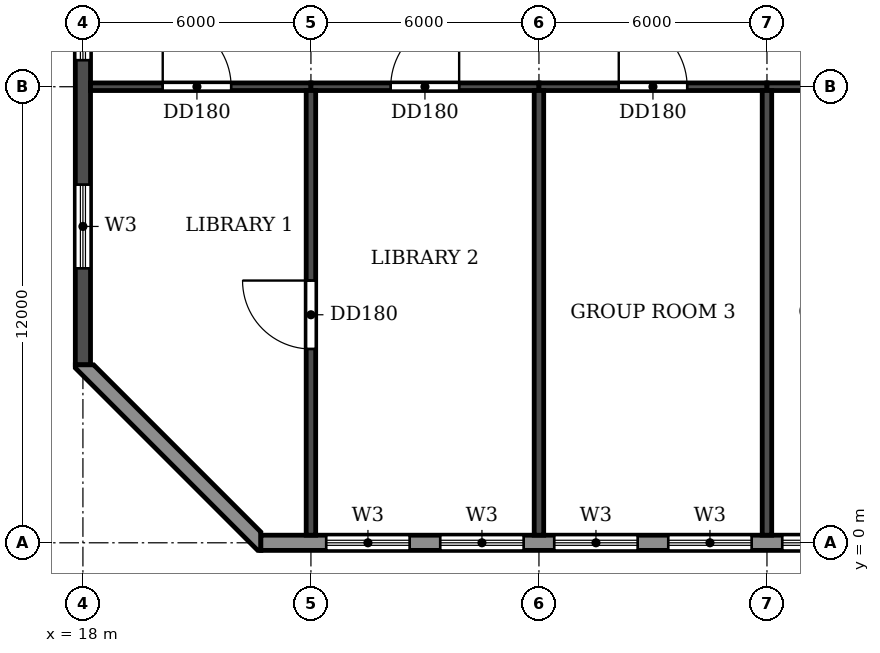
"""IFC4 building model, lengths in metres.
Left out: names, types, materials, properties, quantities, classifications, styles, units other than length and angle.
Written with IfcOpenShell. Run it as: python <this file> out.ifc"""

import sys

from ifc_helpers import new_model, si_unit, direction, frame, frame_2d, origin, place, context, subcontext, project, spatial, polyline, rectangle, outline, extrude, element, fill, save


model = new_model("IFC4")
c1 = context("Model", 3, precision=1e-05, world=origin(), true_north=direction((0.0, 1.0)))
c2 = subcontext(c1, "Body", "Model", "MODEL_VIEW")
j1 = project(units=[si_unit("LENGTHUNIT", "METRE"), si_unit("PLANEANGLEUNIT", "RADIAN")], contexts=[c1])
p1 = place(None, origin())
s1 = spatial("IfcSite", under=j1, at=p1, CompositionType="ELEMENT")
p2 = place(p1, origin())
s2 = spatial("IfcBuilding", under=s1, at=p2, CompositionType="ELEMENT")
p3 = place(p2, frame((0.0, 0.0, 211.5)))
s3 = spatial("IfcBuildingStorey", under=s2, at=p3, CompositionType="ELEMENT", Elevation=211.5)
p4 = place(p3, frame((24.0, 0.2, 0.0), z_axis=(0.0, 0.0, 1.0), x_axis=(0.0, 1.0, 0.0)))
e1 = element("IfcWall", 1, at=p4, inside=s3, PredefinedType="SHEAR", context=c2, shape_type="SweptSolid", body=[
    extrude(rectangle(XDim=11.7, YDim=0.25, at=frame_2d((5.85, 0.0))), origin(), (0.0, 0.0, 1.0), 2.95),
])
p5 = place(p4, frame((4.9, 0.0, 0.0)))
e2 = element("IfcOpeningElement", 2, at=p5, cuts=e1, PredefinedType="OPENING", context=c2, shape_type="SweptSolid", body=[
    extrude(rectangle(XDim=1.8, YDim=2.1, at=frame_2d((0.9, 1.05))), frame((0.0, 0.135, 0.0), z_axis=(0.0, -1.0, 0.0), x_axis=(1.0, 0.0, 0.0)), (0.0, 0.0, 1.0), 0.27),
])
for number, where, z_axis, x_axis in (
    (3, (30.0, 0.2, 0.0), (0.0, 0.0, 1.0), (0.0, 1.0, 0.0)),
    (4, (36.0, 0.2, 0.0), (0.0, 0.0, 1.0), (0.0, 1.0, 0.0)),
):
    element("IfcWall", number, at=place(p3, frame(where, z_axis=z_axis, x_axis=x_axis)), inside=s3, PredefinedType="SHEAR", context=c2, shape_type="SweptSolid", body=[
        extrude(rectangle(XDim=11.7, YDim=0.25, at=frame_2d((5.85, 0.0))), origin(), (0.0, 0.0, 1.0), 2.95),
    ])
p6 = place(p3, frame((18.0, 4.683, 0.0), z_axis=(0.0, 0.0, 1.0), x_axis=(0.0, 1.0, 0.0)))
e5 = element("IfcWall", 5, at=p6, inside=s3, PredefinedType="SHEAR", context=c2, shape_type="SweptSolid", body=[
    extrude(rectangle(XDim=31.834, YDim=0.4, at=frame_2d((15.917, 0.0))), origin(), (0.0, 0.0, 1.0), 2.95),
])
p7 = place(p6, frame((23.817, 0.0, 0.9)))
e6 = element("IfcOpeningElement", 6, at=p7, cuts=e5, PredefinedType="OPENING", context=c2, shape_type="SweptSolid", body=[
    extrude(rectangle(XDim=1.2, YDim=1.5, at=frame_2d((0.6, 0.75))), frame((0.0, 0.21, 0.0), z_axis=(0.0, -1.0, 0.0), x_axis=(1.0, 0.0, 0.0)), (0.0, 0.0, 1.0), 0.42),
])
p8 = place(p6, frame((8.017, 0.0, 0.9)))
e7 = element("IfcOpeningElement", 7, at=p8, cuts=e5, PredefinedType="OPENING", context=c2, shape_type="SweptSolid", body=[
    extrude(rectangle(XDim=1.2, YDim=1.5, at=frame_2d((0.6, 0.75))), frame((0.0, 0.21, 0.0), z_axis=(0.0, -1.0, 0.0), x_axis=(1.0, 0.0, 0.0)), (0.0, 0.0, 1.0), 0.42),
])
p9 = place(p6, frame((27.694, 0.0, 0.6)))
e8 = element("IfcOpeningElement", 8, at=p9, cuts=e5, PredefinedType="OPENING", context=c2, shape_type="SweptSolid", body=[
    extrude(rectangle(XDim=2.2, YDim=1.8, at=frame_2d((1.1, 0.9))), frame((0.0, 0.21, 0.0), z_axis=(0.0, -1.0, 0.0), x_axis=(1.0, 0.0, 0.0)), (0.0, 0.0, 1.0), 0.42),
])
p10 = place(p6, frame((2.541, 0.0, 0.6)))
e9 = element("IfcOpeningElement", 9, at=p10, cuts=e5, PredefinedType="OPENING", context=c2, shape_type="SweptSolid", body=[
    extrude(rectangle(XDim=2.2, YDim=1.8, at=frame_2d((1.1, 0.9))), frame((0.0, 0.21, 0.0), z_axis=(0.0, -1.0, 0.0), x_axis=(1.0, 0.0, 0.0)), (0.0, 0.0, 1.0), 0.42),
])
p11 = place(p6, frame((15.917, 0.0, 0.9)))
e10 = element("IfcOpeningElement", 10, at=p11, cuts=e5, PredefinedType="OPENING", context=c2, shape_type="SweptSolid", body=[
    extrude(rectangle(XDim=1.2, YDim=1.5, at=frame_2d((0.6, 0.75))), frame((0.0, 0.21, 0.0), z_axis=(0.0, -1.0, 0.0), x_axis=(1.0, 0.0, 0.0)), (0.0, 0.0, 1.0), 0.42),
])
p12 = place(p3, frame((18.2, 12.0, 0.0), z_axis=(0.0, 0.0, 1.0), x_axis=(1.0, 0.0, 0.0)))
e11 = element("IfcWall", 11, at=p12, inside=s3, PredefinedType="SHEAR", context=c2, shape_type="SweptSolid", body=[
    extrude(rectangle(XDim=5.8, YDim=0.2, at=frame_2d((2.9, 0.0))), origin(), (0.0, 0.0, 1.0), 2.35),
])
p13 = place(p12, frame((1.9, 0.0, 0.0)))
e12 = element("IfcOpeningElement", 12, at=p13, cuts=e11, PredefinedType="OPENING", context=c2, shape_type="SweptSolid", body=[
    extrude(rectangle(XDim=1.8, YDim=2.1, at=frame_2d((0.9, 1.05))), frame((0.0, 0.11, 0.0), z_axis=(0.0, -1.0, 0.0), x_axis=(1.0, 0.0, 0.0)), (0.0, 0.0, 1.0), 0.22),
])
p14 = place(p3, frame((24.0, 12.0, 0.0), z_axis=(0.0, 0.0, 1.0), x_axis=(1.0, 0.0, 0.0)))
e13 = element("IfcWall", 13, at=p14, inside=s3, PredefinedType="SHEAR", context=c2, shape_type="SweptSolid", body=[
    extrude(rectangle(XDim=6.0, YDim=0.2, at=frame_2d((3.0, 0.0))), origin(), (0.0, 0.0, 1.0), 2.35),
])
p15 = place(p14, frame((2.1, 0.0, 0.0)))
e14 = element("IfcOpeningElement", 14, at=p15, cuts=e13, PredefinedType="OPENING", context=c2, shape_type="SweptSolid", body=[
    extrude(rectangle(XDim=1.8, YDim=2.1, at=frame_2d((0.9, 1.05))), frame((0.0, 0.11, 0.0), z_axis=(0.0, -1.0, 0.0), x_axis=(1.0, 0.0, 0.0)), (0.0, 0.0, 1.0), 0.22),
])
p16 = place(p3, frame((30.0, 12.0, 0.0), z_axis=(0.0, 0.0, 1.0), x_axis=(1.0, 0.0, 0.0)))
e15 = element("IfcWall", 15, at=p16, inside=s3, PredefinedType="SHEAR", context=c2, shape_type="SweptSolid", body=[
    extrude(rectangle(XDim=6.0, YDim=0.2, at=frame_2d((3.0, 0.0))), origin(), (0.0, 0.0, 1.0), 2.35),
])
p17 = place(p16, frame((2.1, 0.0, 0.0)))
e16 = element("IfcOpeningElement", 16, at=p17, cuts=e15, PredefinedType="OPENING", context=c2, shape_type="SweptSolid", body=[
    extrude(rectangle(XDim=1.8, YDim=2.1, at=frame_2d((0.9, 1.05))), frame((0.0, 0.11, 0.0), z_axis=(0.0, -1.0, 0.0), x_axis=(1.0, 0.0, 0.0)), (0.0, 0.0, 1.0), 0.22),
])
p18 = place(p3, frame((36.0, 12.0, 0.0), z_axis=(0.0, 0.0, 1.0), x_axis=(1.0, 0.0, 0.0)))
e17 = element("IfcWall", 17, at=p18, inside=s3, PredefinedType="SHEAR", context=c2, shape_type="SweptSolid", body=[
    extrude(rectangle(XDim=6.0, YDim=0.2, at=frame_2d((3.0, 0.0))), origin(), (0.0, 0.0, 1.0), 2.35),
])
p19 = place(p18, frame((2.1, 0.0, 0.0)))
e18 = element("IfcOpeningElement", 18, at=p19, cuts=e17, PredefinedType="OPENING", context=c2, shape_type="SweptSolid", body=[
    extrude(rectangle(XDim=1.8, YDim=2.1, at=frame_2d((0.9, 1.05))), frame((0.0, 0.11, 0.0), z_axis=(0.0, -1.0, 0.0), x_axis=(1.0, 0.0, 0.0)), (0.0, 0.0, 1.0), 0.22),
])
p20 = place(p3, frame((22.683, 0.0, 0.0), z_axis=(0.0, 0.0, 1.0), x_axis=(1.0, 0.0, 0.0)))
e19 = element("IfcWall", 19, at=p20, inside=s3, PredefinedType="STANDARD", context=c2, shape_type="SweptSolid", body=[
    extrude(rectangle(XDim=56.634, YDim=0.4, at=frame_2d((28.317, 0.0))), origin(), (0.0, 0.0, 1.0), 2.95),
])
p21 = place(p20, frame((1.717, 0.0, 0.6)))
e20 = element("IfcOpeningElement", 20, at=p21, cuts=e19, PredefinedType="OPENING", context=c2, shape_type="SweptSolid", body=[
    extrude(rectangle(XDim=2.2, YDim=1.8, at=frame_2d((1.1, 0.9))), frame((0.0, 0.21, 0.0), z_axis=(0.0, -1.0, 0.0), x_axis=(1.0, 0.0, 0.0)), (0.0, 0.0, 1.0), 0.42),
])
p22 = place(p20, frame((4.717, 0.0, 0.6)))
e21 = element("IfcOpeningElement", 21, at=p22, cuts=e19, PredefinedType="OPENING", context=c2, shape_type="SweptSolid", body=[
    extrude(rectangle(XDim=2.2, YDim=1.8, at=frame_2d((1.1, 0.9))), frame((0.0, 0.21, 0.0), z_axis=(0.0, -1.0, 0.0), x_axis=(1.0, 0.0, 0.0)), (0.0, 0.0, 1.0), 0.42),
])
p23 = place(p20, frame((7.717, 0.0, 0.6)))
e22 = element("IfcOpeningElement", 22, at=p23, cuts=e19, PredefinedType="OPENING", context=c2, shape_type="SweptSolid", body=[
    extrude(rectangle(XDim=2.2, YDim=1.8, at=frame_2d((1.1, 0.9))), frame((0.0, 0.21, 0.0), z_axis=(0.0, -1.0, 0.0), x_axis=(1.0, 0.0, 0.0)), (0.0, 0.0, 1.0), 0.42),
])
p24 = place(p20, frame((10.717, 0.0, 0.6)))
e23 = element("IfcOpeningElement", 23, at=p24, cuts=e19, PredefinedType="OPENING", context=c2, shape_type="SweptSolid", body=[
    extrude(rectangle(XDim=2.2, YDim=1.8, at=frame_2d((1.1, 0.9))), frame((0.0, 0.21, 0.0), z_axis=(0.0, -1.0, 0.0), x_axis=(1.0, 0.0, 0.0)), (0.0, 0.0, 1.0), 0.42),
])
p25 = place(p20, frame((13.717, 0.0, 0.6)))
e24 = element("IfcOpeningElement", 24, at=p25, cuts=e19, PredefinedType="OPENING", context=c2, shape_type="SweptSolid", body=[
    extrude(rectangle(XDim=2.2, YDim=1.8, at=frame_2d((1.1, 0.9))), frame((0.0, 0.21, 0.0), z_axis=(0.0, -1.0, 0.0), x_axis=(1.0, 0.0, 0.0)), (0.0, 0.0, 1.0), 0.42),
])
p26 = place(p20, frame((16.717, 0.0, 0.6)))
e25 = element("IfcOpeningElement", 25, at=p26, cuts=e19, PredefinedType="OPENING", context=c2, shape_type="SweptSolid", body=[
    extrude(rectangle(XDim=2.2, YDim=1.8, at=frame_2d((1.1, 0.9))), frame((0.0, 0.21, 0.0), z_axis=(0.0, -1.0, 0.0), x_axis=(1.0, 0.0, 0.0)), (0.0, 0.0, 1.0), 0.42),
])
p27 = place(p20, frame((19.717, 0.0, 0.6)))
e26 = element("IfcOpeningElement", 26, at=p27, cuts=e19, PredefinedType="OPENING", context=c2, shape_type="SweptSolid", body=[
    extrude(rectangle(XDim=2.2, YDim=1.8, at=frame_2d((1.1, 0.9))), frame((0.0, 0.21, 0.0), z_axis=(0.0, -1.0, 0.0), x_axis=(1.0, 0.0, 0.0)), (0.0, 0.0, 1.0), 0.42),
])
p28 = place(p20, frame((22.717, 0.0, 0.6)))
e27 = element("IfcOpeningElement", 27, at=p28, cuts=e19, PredefinedType="OPENING", context=c2, shape_type="SweptSolid", body=[
    extrude(rectangle(XDim=2.2, YDim=1.8, at=frame_2d((1.1, 0.9))), frame((0.0, 0.21, 0.0), z_axis=(0.0, -1.0, 0.0), x_axis=(1.0, 0.0, 0.0)), (0.0, 0.0, 1.0), 0.42),
])
p29 = place(p20, frame((25.717, 0.0, 0.6)))
e28 = element("IfcOpeningElement", 28, at=p29, cuts=e19, PredefinedType="OPENING", context=c2, shape_type="SweptSolid", body=[
    extrude(rectangle(XDim=2.2, YDim=1.8, at=frame_2d((1.1, 0.9))), frame((0.0, 0.21, 0.0), z_axis=(0.0, -1.0, 0.0), x_axis=(1.0, 0.0, 0.0)), (0.0, 0.0, 1.0), 0.42),
])
p30 = place(p20, frame((28.717, 0.0, 0.6)))
e29 = element("IfcOpeningElement", 29, at=p30, cuts=e19, PredefinedType="OPENING", context=c2, shape_type="SweptSolid", body=[
    extrude(rectangle(XDim=2.2, YDim=1.8, at=frame_2d((1.1, 0.9))), frame((0.0, 0.21, 0.0), z_axis=(0.0, -1.0, 0.0), x_axis=(1.0, 0.0, 0.0)), (0.0, 0.0, 1.0), 0.42),
])
p31 = place(p20, frame((31.717, 0.0, 0.6)))
e30 = element("IfcOpeningElement", 30, at=p31, cuts=e19, PredefinedType="OPENING", context=c2, shape_type="SweptSolid", body=[
    extrude(rectangle(XDim=2.2, YDim=1.8, at=frame_2d((1.1, 0.9))), frame((0.0, 0.21, 0.0), z_axis=(0.0, -1.0, 0.0), x_axis=(1.0, 0.0, 0.0)), (0.0, 0.0, 1.0), 0.42),
])
p32 = place(p20, frame((34.717, 0.0, 0.6)))
e31 = element("IfcOpeningElement", 31, at=p32, cuts=e19, PredefinedType="OPENING", context=c2, shape_type="SweptSolid", body=[
    extrude(rectangle(XDim=2.2, YDim=1.8, at=frame_2d((1.1, 0.9))), frame((0.0, 0.21, 0.0), z_axis=(0.0, -1.0, 0.0), x_axis=(1.0, 0.0, 0.0)), (0.0, 0.0, 1.0), 0.42),
])
p33 = place(p20, frame((43.717, 0.0, 0.6)))
e32 = element("IfcOpeningElement", 32, at=p33, cuts=e19, PredefinedType="OPENING", context=c2, shape_type="SweptSolid", body=[
    extrude(rectangle(XDim=2.2, YDim=1.8, at=frame_2d((1.1, 0.9))), frame((0.0, 0.21, 0.0), z_axis=(0.0, -1.0, 0.0), x_axis=(1.0, 0.0, 0.0)), (0.0, 0.0, 1.0), 0.42),
])
p34 = place(p20, frame((46.717, 0.0, 0.6)))
e33 = element("IfcOpeningElement", 33, at=p34, cuts=e19, PredefinedType="OPENING", context=c2, shape_type="SweptSolid", body=[
    extrude(rectangle(XDim=2.2, YDim=1.8, at=frame_2d((1.1, 0.9))), frame((0.0, 0.21, 0.0), z_axis=(0.0, -1.0, 0.0), x_axis=(1.0, 0.0, 0.0)), (0.0, 0.0, 1.0), 0.42),
])
p35 = place(p20, frame((49.717, 0.0, 0.6)))
e34 = element("IfcOpeningElement", 34, at=p35, cuts=e19, PredefinedType="OPENING", context=c2, shape_type="SweptSolid", body=[
    extrude(rectangle(XDim=2.2, YDim=1.8, at=frame_2d((1.1, 0.9))), frame((0.0, 0.21, 0.0), z_axis=(0.0, -1.0, 0.0), x_axis=(1.0, 0.0, 0.0)), (0.0, 0.0, 1.0), 0.42),
])
p36 = place(p20, frame((52.717, 0.0, 0.6)))
e35 = element("IfcOpeningElement", 35, at=p36, cuts=e19, PredefinedType="OPENING", context=c2, shape_type="SweptSolid", body=[
    extrude(rectangle(XDim=2.2, YDim=1.8, at=frame_2d((1.1, 0.9))), frame((0.0, 0.21, 0.0), z_axis=(0.0, -1.0, 0.0), x_axis=(1.0, 0.0, 0.0)), (0.0, 0.0, 1.0), 0.42),
])
p37 = place(p3, origin())
e36 = element("IfcWall", 36, at=p37, inside=s3, PredefinedType="STANDARD", context=c2, shape_type="SweptSolid", body=[
    extrude(outline(polyline([(17.8, 4.683), (17.8, 4.6), (22.6, -0.2), (22.683, -0.2), (22.683, 0.283), (18.283, 4.683), (17.8, 4.683)])), origin(), (0.0, 0.0, 1.0), 2.95),
])
p38 = place(p21, origin())
e37 = element("IfcWindow", 37, at=p38, inside=s3, PartitioningType="DOUBLE_PANEL_HORIZONTAL", PredefinedType="WINDOW", context=c2, shape_type="SweptSolid", body=[
    extrude(rectangle(XDim=2.2, YDim=1.8, at=frame_2d((1.1, 0.9))), frame((0.0, 0.03, 0.0), z_axis=(0.0, -1.0, 0.0), x_axis=(1.0, 0.0, 0.0)), (0.0, 0.0, 1.0), 0.06),
])
fill(e20, e37)
p39 = place(p22, origin())
e38 = element("IfcWindow", 38, at=p39, inside=s3, PartitioningType="DOUBLE_PANEL_HORIZONTAL", PredefinedType="WINDOW", context=c2, shape_type="SweptSolid", body=[
    extrude(rectangle(XDim=2.2, YDim=1.8, at=frame_2d((1.1, 0.9))), frame((0.0, 0.03, 0.0), z_axis=(0.0, -1.0, 0.0), x_axis=(1.0, 0.0, 0.0)), (0.0, 0.0, 1.0), 0.06),
])
fill(e21, e38)
p40 = place(p23, origin())
e39 = element("IfcWindow", 39, at=p40, inside=s3, PartitioningType="DOUBLE_PANEL_HORIZONTAL", PredefinedType="WINDOW", context=c2, shape_type="SweptSolid", body=[
    extrude(rectangle(XDim=2.2, YDim=1.8, at=frame_2d((1.1, 0.9))), frame((0.0, 0.03, 0.0), z_axis=(0.0, -1.0, 0.0), x_axis=(1.0, 0.0, 0.0)), (0.0, 0.0, 1.0), 0.06),
])
fill(e22, e39)
p41 = place(p24, origin())
e40 = element("IfcWindow", 40, at=p41, inside=s3, PartitioningType="DOUBLE_PANEL_HORIZONTAL", PredefinedType="WINDOW", context=c2, shape_type="SweptSolid", body=[
    extrude(rectangle(XDim=2.2, YDim=1.8, at=frame_2d((1.1, 0.9))), frame((0.0, 0.03, 0.0), z_axis=(0.0, -1.0, 0.0), x_axis=(1.0, 0.0, 0.0)), (0.0, 0.0, 1.0), 0.06),
])
fill(e23, e40)
p42 = place(p25, origin())
e41 = element("IfcWindow", 41, at=p42, inside=s3, PartitioningType="DOUBLE_PANEL_HORIZONTAL", PredefinedType="WINDOW", context=c2, shape_type="SweptSolid", body=[
    extrude(rectangle(XDim=2.2, YDim=1.8, at=frame_2d((1.1, 0.9))), frame((0.0, 0.03, 0.0), z_axis=(0.0, -1.0, 0.0), x_axis=(1.0, 0.0, 0.0)), (0.0, 0.0, 1.0), 0.06),
])
fill(e24, e41)
p43 = place(p8, origin())
e42 = element("IfcWindow", 42, at=p43, inside=s3, PartitioningType="SINGLE_PANEL", PredefinedType="WINDOW", context=c2, shape_type="SweptSolid", body=[
    extrude(rectangle(XDim=1.2, YDim=1.5, at=frame_2d((0.6, 0.75))), frame((0.0, 0.03, 0.0), z_axis=(0.0, -1.0, 0.0), x_axis=(1.0, 0.0, 0.0)), (0.0, 0.0, 1.0), 0.06),
])
fill(e7, e42)
p44 = place(p10, origin())
e43 = element("IfcWindow", 43, at=p44, inside=s3, PartitioningType="DOUBLE_PANEL_HORIZONTAL", PredefinedType="WINDOW", context=c2, shape_type="SweptSolid", body=[
    extrude(rectangle(XDim=2.2, YDim=1.8, at=frame_2d((1.1, 0.9))), frame((0.0, 0.03, 0.0), z_axis=(0.0, -1.0, 0.0), x_axis=(1.0, 0.0, 0.0)), (0.0, 0.0, 1.0), 0.06),
])
fill(e9, e43)
p45 = place(p13, origin())
e44 = element("IfcDoor", 44, at=p45, inside=s3, OperationType="DOUBLE_DOOR_SINGLE_SWING", PredefinedType="DOOR", context=c2, shape_type="SweptSolid", body=[
    extrude(rectangle(XDim=1.8, YDim=2.1, at=frame_2d((0.9, 1.05))), frame((0.0, 0.025, 0.0), z_axis=(0.0, -1.0, 0.0), x_axis=(1.0, 0.0, 0.0)), (0.0, 0.0, 1.0), 0.05),
])
fill(e12, e44)
p46 = place(p15, origin())
e45 = element("IfcDoor", 45, at=p46, inside=s3, OperationType="DOUBLE_DOOR_SINGLE_SWING", PredefinedType="DOOR", context=c2, shape_type="SweptSolid", body=[
    extrude(rectangle(XDim=1.8, YDim=2.1, at=frame_2d((0.9, 1.05))), frame((0.0, 0.025, 0.0), z_axis=(0.0, -1.0, 0.0), x_axis=(1.0, 0.0, 0.0)), (0.0, 0.0, 1.0), 0.05),
])
fill(e14, e45)
p47 = place(p17, origin())
e46 = element("IfcDoor", 46, at=p47, inside=s3, OperationType="DOUBLE_DOOR_SINGLE_SWING", PredefinedType="DOOR", context=c2, shape_type="SweptSolid", body=[
    extrude(rectangle(XDim=1.8, YDim=2.1, at=frame_2d((0.9, 1.05))), frame((0.0, 0.025, 0.0), z_axis=(0.0, -1.0, 0.0), x_axis=(1.0, 0.0, 0.0)), (0.0, 0.0, 1.0), 0.05),
])
fill(e16, e46)
p48 = place(p5, origin())
e47 = element("IfcDoor", 47, at=p48, inside=s3, OperationType="DOUBLE_DOOR_SINGLE_SWING", PredefinedType="DOOR", context=c2, shape_type="SweptSolid", body=[
    extrude(rectangle(XDim=1.8, YDim=2.1, at=frame_2d((0.9, 1.05))), frame((0.0, 0.025, 0.0), z_axis=(0.0, -1.0, 0.0), x_axis=(1.0, 0.0, 0.0)), (0.0, 0.0, 1.0), 0.05),
])
fill(e2, e47)
save(model, sys.argv[1])
